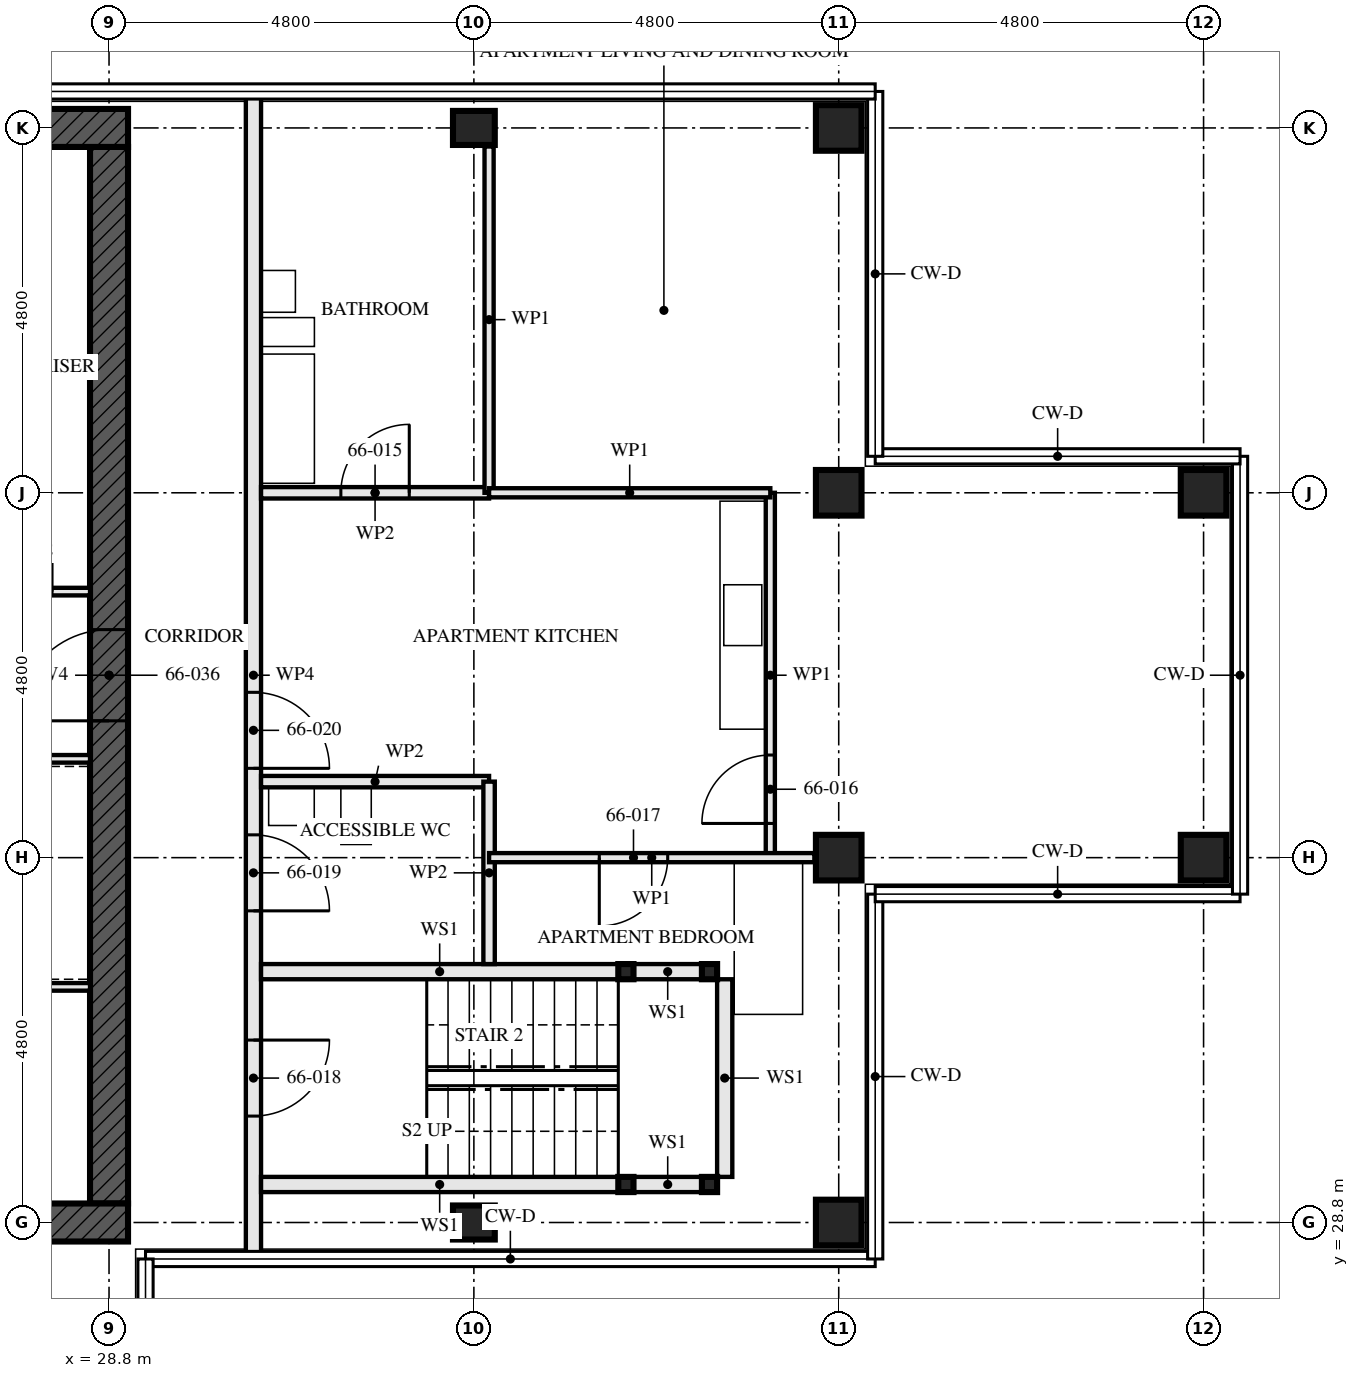
"""IFC4 building model, lengths in metres.
Left out: names, types, materials, properties, quantities, classifications, styles, units other than length and angle.
Written with IfcOpenShell. Run it as: python <this file> out.ifc"""

import sys

from ifc_helpers import new_model, si_unit, direction, frame, frame_2d, origin, origin_2d, place, context, subcontext, project, spatial, rectangle, hollow_rectangle, i_section, extrude, element, fill, save


model = new_model("IFC4")
c1 = context("Model", 3, precision=1e-05, world=origin(), true_north=direction((0.0, 1.0)))
c2 = subcontext(c1, "Body", "Model", "MODEL_VIEW")
j1 = project(units=[si_unit("LENGTHUNIT", "METRE"), si_unit("PLANEANGLEUNIT", "RADIAN")], contexts=[c1])
p1 = place(None, origin())
s1 = spatial("IfcSite", under=j1, at=p1, CompositionType="ELEMENT")
p2 = place(p1, origin())
s2 = spatial("IfcBuilding", under=s1, at=p2, CompositionType="ELEMENT")
p3 = place(p2, frame((0.0, 0.0, 240.0)))
s3 = spatial("IfcBuildingStorey", under=s2, at=p3, CompositionType="ELEMENT", Elevation=240.0)
for number, where, z_axis, x_axis in (
    (1, (33.6, 28.8, 0.0), (0.0, 0.0, 1.0), (0.0, 1.0, 0.0)),
    (2, (33.6, 43.2, 0.0), (0.0, 0.0, 1.0), (0.0, 1.0, 0.0)),
):
    element("IfcColumn", number, at=place(p3, frame(where, z_axis=z_axis, x_axis=x_axis)), inside=s3, PredefinedType="COLUMN", context=c2, shape_type="SweptSolid", body=[
        extrude(i_section(OverallWidth=0.448, OverallDepth=0.55, WebThickness=0.072, FlangeThickness=0.115, FilletRadius=0.015, at=origin_2d()), origin(), (0.0, 0.0, 1.0), 3.5),
    ])
for number, where, z_axis, x_axis in (
    (3, (38.4, 28.8, 0.0), (0.0, 0.0, 1.0), (0.0, 1.0, 0.0)),
    (4, (38.4, 33.6, 0.0), (0.0, 0.0, 1.0), (0.0, 1.0, 0.0)),
    (5, (38.4, 38.4, 0.0), (0.0, 0.0, 1.0), (0.0, 1.0, 0.0)),
    (6, (38.4, 43.2, 0.0), (0.0, 0.0, 1.0), (0.0, 1.0, 0.0)),
    (7, (43.2, 33.6, 0.0), (0.0, 0.0, 1.0), (0.0, 1.0, 0.0)),
    (8, (43.2, 38.4, 0.0), (0.0, 0.0, 1.0), (0.0, 1.0, 0.0)),
):
    element("IfcColumn", number, at=place(p3, frame(where, z_axis=z_axis, x_axis=x_axis)), inside=s3, PredefinedType="COLUMN", context=c2, shape_type="SweptSolid", body=[
        extrude(hollow_rectangle(XDim=0.6, YDim=0.6, WallThickness=0.05, at=origin_2d()), origin(), (0.0, 0.0, 1.0), 3.5),
    ])
p4 = place(p3, frame((14.15, 28.8, -0.17), z_axis=(0.0, 0.0, 1.0), x_axis=(1.0, 0.0, 0.0)))
e9 = element("IfcWall", 9, at=p4, inside=s3, PredefinedType="SHEAR", context=c2, shape_type="SweptSolid", body=[
    extrude(rectangle(XDim=14.9, YDim=0.5, at=frame_2d((7.45, 0.0))), origin(), (0.0, 0.0, 1.0), 3.42),
])
p5 = place(p4, frame((6.85, 0.0, 0.17)))
e10 = element("IfcOpeningElement", 10, at=p5, cuts=e9, PredefinedType="OPENING", context=c2, shape_type="SweptSolid", body=[
    extrude(rectangle(XDim=1.2, YDim=2.1, at=frame_2d((0.6, 1.05))), frame((0.0, 0.26, 0.0), z_axis=(0.0, -1.0, 0.0), x_axis=(1.0, 0.0, 0.0)), (0.0, 0.0, 1.0), 0.521),
])
p6 = place(p3, frame((29.05, 43.2, -0.17), z_axis=(0.0, 0.0, 1.0), x_axis=(-1.0, 0.0, 0.0)))
e11 = element("IfcWall", 11, at=p6, inside=s3, PredefinedType="SHEAR", context=c2, shape_type="SweptSolid", body=[
    extrude(rectangle(XDim=14.9, YDim=0.5, at=frame_2d((7.45, 0.0))), origin(), (0.0, 0.0, 1.0), 3.42),
])
p7 = place(p3, frame((28.8, 29.05, -0.17), z_axis=(0.0, 0.0, 1.0), x_axis=(0.0, 1.0, 0.0)))
e12 = element("IfcWall", 12, at=p7, inside=s3, PredefinedType="SHEAR", context=c2, shape_type="SweptSolid", body=[
    extrude(rectangle(XDim=13.9, YDim=0.5, at=frame_2d((6.95, 0.0))), origin(), (0.0, 0.0, 1.0), 3.42),
])
p8 = place(p7, frame((6.35, 0.0, 0.17)))
e13 = element("IfcOpeningElement", 13, at=p8, cuts=e12, PredefinedType="OPENING", context=c2, shape_type="SweptSolid", body=[
    extrude(rectangle(XDim=1.2, YDim=2.1, at=frame_2d((0.6, 1.05))), frame((0.0, 0.26, 0.0), z_axis=(0.0, -1.0, 0.0), x_axis=(1.0, 0.0, 0.0)), (0.0, 0.0, 1.0), 0.521),
])
for number, where, z_axis, x_axis in (
    (14, (36.7, 29.3, 0.0), (0.0, 0.0, 1.0), (1.0, 0.0, 0.0)),
    (15, (36.7, 32.1, 0.0), (0.0, 0.0, 1.0), (1.0, 0.0, 0.0)),
    (16, (35.6, 29.3, 0.0), (0.0, 0.0, 1.0), (1.0, 0.0, 0.0)),
    (17, (35.6, 32.1, 0.0), (0.0, 0.0, 1.0), (1.0, 0.0, 0.0)),
):
    element("IfcColumn", number, at=place(p3, frame(where, z_axis=z_axis, x_axis=x_axis)), inside=s3, PredefinedType="COLUMN", context=c2, shape_type="SweptSolid", body=[
        extrude(hollow_rectangle(XDim=0.2, YDim=0.2, WallThickness=0.008, at=origin_2d()), origin(), (0.0, 0.0, 1.0), 3.25),
    ])
p9 = place(p3, frame((36.6, 29.3, 0.0), z_axis=(0.0, 0.0, 1.0), x_axis=(-1.0, 0.0, 0.0)))
e18 = element("IfcWall", 18, at=p9, inside=s3, PredefinedType="SOLIDWALL", context=c2, shape_type="SweptSolid", body=[
    extrude(rectangle(XDim=0.9, YDim=0.2, at=frame_2d((0.45, 0.0))), origin(), (0.0, 0.0, 1.0), 2.94),
])
p10 = place(p3, frame((35.5, 29.3, 0.0), z_axis=(0.0, 0.0, 1.0), x_axis=(-1.0, 0.0, 0.0)))
e19 = element("IfcWall", 19, at=p10, inside=s3, PredefinedType="SOLIDWALL", context=c2, shape_type="SweptSolid", body=[
    extrude(rectangle(XDim=4.7, YDim=0.2, at=frame_2d((2.35, 0.0))), origin(), (0.0, 0.0, 1.0), 2.94),
])
p11 = place(p3, frame((36.6, 32.1, 0.0), z_axis=(0.0, 0.0, 1.0), x_axis=(-1.0, 0.0, 0.0)))
e20 = element("IfcWall", 20, at=p11, inside=s3, PredefinedType="SOLIDWALL", context=c2, shape_type="SweptSolid", body=[
    extrude(rectangle(XDim=0.9, YDim=0.2, at=frame_2d((0.45, 0.0))), origin(), (0.0, 0.0, 1.0), 2.94),
])
p12 = place(p3, frame((35.5, 32.1, 0.0), z_axis=(0.0, 0.0, 1.0), x_axis=(-1.0, 0.0, 0.0)))
e21 = element("IfcWall", 21, at=p12, inside=s3, PredefinedType="SOLIDWALL", context=c2, shape_type="SweptSolid", body=[
    extrude(rectangle(XDim=4.7, YDim=0.2, at=frame_2d((2.35, 0.0))), origin(), (0.0, 0.0, 1.0), 2.94),
])
p13 = place(p3, frame((36.9, 29.4, 0.0), z_axis=(0.0, 0.0, 1.0), x_axis=(0.0, 1.0, 0.0)))
e22 = element("IfcWall", 22, at=p13, inside=s3, PredefinedType="SOLIDWALL", context=c2, shape_type="SweptSolid", body=[
    extrude(rectangle(XDim=2.6, YDim=0.2, at=frame_2d((1.3, 0.0))), origin(), (0.0, 0.0, 1.0), 3.25),
])
p14 = place(p3, frame((33.8, 32.2, 0.0), z_axis=(0.0, 0.0, 1.0), x_axis=(0.0, 1.0, 0.0)))
e23 = element("IfcWall", 23, at=p14, inside=s3, PredefinedType="PARTITIONING", context=c2, shape_type="SweptSolid", body=[
    extrude(rectangle(XDim=2.4, YDim=0.15, at=frame_2d((1.2, 0.0))), origin(), (0.0, 0.0, 1.0), 2.24),
])
p15 = place(p3, frame((33.8, 34.6, 0.0), z_axis=(0.0, 0.0, 1.0), x_axis=(-1.0, 0.0, 0.0)))
e24 = element("IfcWall", 24, at=p15, inside=s3, PredefinedType="PARTITIONING", context=c2, shape_type="SweptSolid", body=[
    extrude(rectangle(XDim=3.0, YDim=0.15, at=frame_2d((1.5, 0.0))), origin(), (0.0, 0.0, 1.0), 3.25),
])
p16 = place(p3, frame((33.8, 38.4, 0.0), z_axis=(0.0, 0.0, 1.0), x_axis=(-1.0, 0.0, 0.0)))
e25 = element("IfcWall", 25, at=p16, inside=s3, PredefinedType="PARTITIONING", context=c2, shape_type="SweptSolid", body=[
    extrude(rectangle(XDim=3.0, YDim=0.15, at=frame_2d((1.5, 0.0))), origin(), (0.0, 0.0, 1.0), 2.24),
])
p17 = place(p16, frame((1.05, 0.0, 0.0)))
e26 = element("IfcOpeningElement", 26, at=p17, cuts=e25, PredefinedType="OPENING", context=c2, shape_type="SweptSolid", body=[
    extrude(rectangle(XDim=0.9, YDim=2.1, at=frame_2d((0.45, 1.05))), frame((0.0, 0.085, 0.0), z_axis=(0.0, -1.0, 0.0), x_axis=(1.0, 0.0, 0.0)), (0.0, 0.0, 1.0), 0.171),
])
p18 = place(p3, frame((37.5, 33.6, 0.0), z_axis=(0.0, 0.0, 1.0), x_axis=(0.0, 1.0, 0.0)))
e27 = element("IfcWall", 27, at=p18, inside=s3, PredefinedType="PARTITIONING", context=c2, shape_type="SweptSolid", body=[
    extrude(rectangle(XDim=4.8, YDim=0.12, at=frame_2d((2.4, 0.0))), origin(), (0.0, 0.0, 1.0), 3.25),
])
p19 = place(p18, frame((0.45, 0.0, 0.0)))
e28 = element("IfcOpeningElement", 28, at=p19, cuts=e27, PredefinedType="OPENING", context=c2, shape_type="SweptSolid", body=[
    extrude(rectangle(XDim=0.9, YDim=2.1, at=frame_2d((0.45, 1.05))), frame((0.0, 0.071, 0.0), z_axis=(0.0, -1.0, 0.0), x_axis=(1.0, 0.0, 0.0)), (0.0, 0.0, 1.0), 0.141),
])
p20 = place(p3, frame((33.8, 38.4, 0.0), z_axis=(0.0, 0.0, 1.0), x_axis=(0.0, 1.0, 0.0)))
e29 = element("IfcWall", 29, at=p20, inside=s3, PredefinedType="PARTITIONING", context=c2, shape_type="SweptSolid", body=[
    extrude(rectangle(XDim=4.556, YDim=0.12, at=frame_2d((2.278, 0.0))), origin(), (0.0, 0.0, 1.0), 3.25),
])
p21 = place(p3, frame((38.08, 33.6, 0.0), z_axis=(0.0, 0.0, 1.0), x_axis=(-1.0, 0.0, 0.0)))
e30 = element("IfcWall", 30, at=p21, inside=s3, PredefinedType="PARTITIONING", context=c2, shape_type="SweptSolid", body=[
    extrude(rectangle(XDim=4.28, YDim=0.12, at=frame_2d((2.14, 0.0))), origin(), (0.0, 0.0, 1.0), 2.24),
])
p22 = place(p21, frame((1.93, 0.0, 0.0)))
e31 = element("IfcOpeningElement", 31, at=p22, cuts=e30, PredefinedType="OPENING", context=c2, shape_type="SweptSolid", body=[
    extrude(rectangle(XDim=0.9, YDim=2.1, at=frame_2d((0.45, 1.05))), frame((0.0, 0.071, 0.0), z_axis=(0.0, -1.0, 0.0), x_axis=(1.0, 0.0, 0.0)), (0.0, 0.0, 1.0), 0.141),
])
p23 = place(p3, frame((37.5, 38.4, 0.0), z_axis=(0.0, 0.0, 1.0), x_axis=(-1.0, 0.0, 0.0)))
e32 = element("IfcWall", 32, at=p23, inside=s3, PredefinedType="PARTITIONING", context=c2, shape_type="SweptSolid", body=[
    extrude(rectangle(XDim=3.7, YDim=0.12, at=frame_2d((1.85, 0.0))), origin(), (0.0, 0.0, 1.0), 2.24),
])
p24 = place(p3, frame((30.7, 28.345, 0.0), z_axis=(0.0, 0.0, 1.0), x_axis=(0.0, 1.0, 0.0)))
e33 = element("IfcWall", 33, at=p24, inside=s3, PredefinedType="PARTITIONING", context=c2, shape_type="SweptSolid", body=[
    extrude(rectangle(XDim=15.31, YDim=0.2, at=frame_2d((7.655, 0.0))), origin(), (0.0, 0.0, 1.0), 2.24),
])
p25 = place(p24, frame((1.855, 0.0, 0.0)))
e34 = element("IfcOpeningElement", 34, at=p25, cuts=e33, PredefinedType="OPENING", context=c2, shape_type="SweptSolid", body=[
    extrude(rectangle(XDim=1.0, YDim=2.1, at=frame_2d((0.5, 1.05))), frame((0.0, 0.111, 0.0), z_axis=(0.0, -1.0, 0.0), x_axis=(1.0, 0.0, 0.0)), (0.0, 0.0, 1.0), 0.221),
])
p26 = place(p24, frame((4.555, 0.0, 0.0)))
e35 = element("IfcOpeningElement", 35, at=p26, cuts=e33, PredefinedType="OPENING", context=c2, shape_type="SweptSolid", body=[
    extrude(rectangle(XDim=1.0, YDim=2.1, at=frame_2d((0.5, 1.05))), frame((0.0, 0.111, 0.0), z_axis=(0.0, -1.0, 0.0), x_axis=(1.0, 0.0, 0.0)), (0.0, 0.0, 1.0), 0.221),
])
p27 = place(p24, frame((6.43, 0.0, 0.0)))
e36 = element("IfcOpeningElement", 36, at=p27, cuts=e33, PredefinedType="OPENING", context=c2, shape_type="SweptSolid", body=[
    extrude(rectangle(XDim=1.0, YDim=2.1, at=frame_2d((0.5, 1.05))), frame((0.0, 0.111, 0.0), z_axis=(0.0, -1.0, 0.0), x_axis=(1.0, 0.0, 0.0)), (0.0, 0.0, 1.0), 0.221),
])
p28 = place(p3, frame((23.05, 34.9, 0.0), z_axis=(0.0, 0.0, 1.0), x_axis=(1.0, 0.0, 0.0)))
e37 = element("IfcWall", 37, at=p28, inside=s3, PredefinedType="SOLIDWALL", context=c2, shape_type="SweptSolid", body=[
    extrude(rectangle(XDim=5.5, YDim=0.1, at=frame_2d((2.75, 0.0))), origin(), (0.0, 0.0, 1.0), 3.25),
])
p29 = place(p28, frame((0.85, 0.0, 0.0)))
e38 = element("IfcOpeningElement", 38, at=p29, cuts=e37, PredefinedType="OPENING", context=c2, shape_type="SweptSolid", body=[
    extrude(rectangle(XDim=1.0, YDim=2.1, at=frame_2d((0.5, 1.05))), frame((0.0, 0.061, 0.0), z_axis=(0.0, -1.0, 0.0), x_axis=(1.0, 0.0, 0.0)), (0.0, 0.0, 1.0), 0.121),
])
p30 = place(p28, frame((3.625, 0.0, 0.0)))
e39 = element("IfcOpeningElement", 39, at=p30, cuts=e37, PredefinedType="OPENING", context=c2, shape_type="SweptSolid", body=[
    extrude(rectangle(XDim=1.0, YDim=2.1, at=frame_2d((0.5, 1.05))), frame((0.0, 0.061, 0.0), z_axis=(0.0, -1.0, 0.0), x_axis=(1.0, 0.0, 0.0)), (0.0, 0.0, 1.0), 0.121),
])
p31 = place(p3, frame((22.65, 37.1, 0.0), z_axis=(0.0, 0.0, 1.0), x_axis=(1.0, 0.0, 0.0)))
e40 = element("IfcWall", 40, at=p31, inside=s3, PredefinedType="SOLIDWALL", context=c2, shape_type="SweptSolid", body=[
    extrude(rectangle(XDim=5.9, YDim=0.1, at=frame_2d((2.95, 0.0))), origin(), (0.0, 0.0, 1.0), 3.25),
])
p32 = place(p31, frame((3.1, 0.0, 0.0)))
e41 = element("IfcOpeningElement", 41, at=p32, cuts=e40, PredefinedType="OPENING", context=c2, shape_type="SweptSolid", body=[
    extrude(rectangle(XDim=1.0, YDim=2.1, at=frame_2d((0.5, 1.05))), frame((0.0, 0.061, 0.0), z_axis=(0.0, -1.0, 0.0), x_axis=(1.0, 0.0, 0.0)), (0.0, 0.0, 1.0), 0.121),
])
p33 = place(p31, frame((4.7, 0.0, 0.0)))
e42 = element("IfcOpeningElement", 42, at=p33, cuts=e40, PredefinedType="OPENING", context=c2, shape_type="SweptSolid", body=[
    extrude(rectangle(XDim=0.7, YDim=2.1, at=frame_2d((0.35, 1.05))), frame((0.0, 0.061, 0.0), z_axis=(0.0, -1.0, 0.0), x_axis=(1.0, 0.0, 0.0)), (0.0, 0.0, 1.0), 0.121),
])
p34 = place(p3, frame((23.15, 31.9, 0.0), z_axis=(0.0, 0.0, 1.0), x_axis=(1.0, 0.0, 0.0)))
e43 = element("IfcWall", 43, at=p34, inside=s3, PredefinedType="SOLIDWALL", context=c2, shape_type="SweptSolid", body=[
    extrude(rectangle(XDim=5.4, YDim=0.1, at=frame_2d((2.7, 0.0))), origin(), (0.0, 0.0, 1.0), 3.25),
])
p35 = place(p17, frame((0.9, 0.0, 0.0), z_axis=(0.0, 0.0, 1.0), x_axis=(-1.0, 0.0, 0.0)))
e44 = element("IfcDoor", 44, at=p35, inside=s3, OperationType="SINGLE_SWING_LEFT", PredefinedType="DOOR", context=c2, shape_type="SweptSolid", body=[
    extrude(rectangle(XDim=0.9, YDim=2.1, at=frame_2d((0.45, 1.05))), frame((0.0, 0.022, 0.0), z_axis=(0.0, -1.0, 0.0), x_axis=(1.0, 0.0, 0.0)), (0.0, 0.0, 1.0), 0.044),
])
fill(e26, e44)
p36 = place(p19, origin())
e45 = element("IfcDoor", 45, at=p36, inside=s3, OperationType="SINGLE_SWING_RIGHT", PredefinedType="DOOR", context=c2, shape_type="SweptSolid", body=[
    extrude(rectangle(XDim=0.9, YDim=2.1, at=frame_2d((0.45, 1.05))), frame((0.0, 0.022, 0.0), z_axis=(0.0, -1.0, 0.0), x_axis=(1.0, 0.0, 0.0)), (0.0, 0.0, 1.0), 0.044),
])
fill(e28, e45)
p37 = place(p22, origin())
e46 = element("IfcDoor", 46, at=p37, inside=s3, OperationType="SINGLE_SWING_LEFT", PredefinedType="DOOR", context=c2, shape_type="SweptSolid", body=[
    extrude(rectangle(XDim=0.9, YDim=2.1, at=frame_2d((0.45, 1.05))), frame((0.0, 0.022, 0.0), z_axis=(0.0, -1.0, 0.0), x_axis=(1.0, 0.0, 0.0)), (0.0, 0.0, 1.0), 0.044),
])
fill(e31, e46)
p38 = place(p25, frame((1.0, 0.0, 0.0), z_axis=(0.0, 0.0, 1.0), x_axis=(-1.0, 0.0, 0.0)))
e47 = element("IfcDoor", 47, at=p38, inside=s3, OperationType="SINGLE_SWING_RIGHT", PredefinedType="DOOR", context=c2, shape_type="SweptSolid", body=[
    extrude(rectangle(XDim=1.0, YDim=2.1, at=frame_2d((0.5, 1.05))), frame((0.0, 0.032, 0.0), z_axis=(0.0, -1.0, 0.0), x_axis=(1.0, 0.0, 0.0)), (0.0, 0.0, 1.0), 0.064),
])
fill(e34, e47)
p39 = place(p26, frame((1.0, 0.0, 0.0), z_axis=(0.0, 0.0, 1.0), x_axis=(-1.0, 0.0, 0.0)))
e48 = element("IfcDoor", 48, at=p39, inside=s3, OperationType="SINGLE_SWING_LEFT", PredefinedType="DOOR", context=c2, shape_type="SweptSolid", body=[
    extrude(rectangle(XDim=1.0, YDim=2.1, at=frame_2d((0.5, 1.05))), frame((0.0, 0.027, 0.0), z_axis=(0.0, -1.0, 0.0), x_axis=(1.0, 0.0, 0.0)), (0.0, 0.0, 1.0), 0.054),
])
fill(e35, e48)
p40 = place(p27, frame((1.0, 0.0, 0.0), z_axis=(0.0, 0.0, 1.0), x_axis=(-1.0, 0.0, 0.0)))
e49 = element("IfcDoor", 49, at=p40, inside=s3, OperationType="SINGLE_SWING_LEFT", PredefinedType="DOOR", context=c2, shape_type="SweptSolid", body=[
    extrude(rectangle(XDim=1.0, YDim=2.1, at=frame_2d((0.5, 1.05))), frame((0.0, 0.027, 0.0), z_axis=(0.0, -1.0, 0.0), x_axis=(1.0, 0.0, 0.0)), (0.0, 0.0, 1.0), 0.054),
])
fill(e36, e49)
p41 = place(p8, origin())
e50 = element("IfcDoor", 50, at=p41, inside=s3, OperationType="SINGLE_SWING_LEFT", PredefinedType="DOOR", context=c2, shape_type="SweptSolid", body=[
    extrude(rectangle(XDim=1.2, YDim=2.1, at=frame_2d((0.6, 1.05))), frame((0.0, 0.027, 0.0), z_axis=(0.0, -1.0, 0.0), x_axis=(1.0, 0.0, 0.0)), (0.0, 0.0, 1.0), 0.054),
])
fill(e13, e50)
save(model, sys.argv[1])
